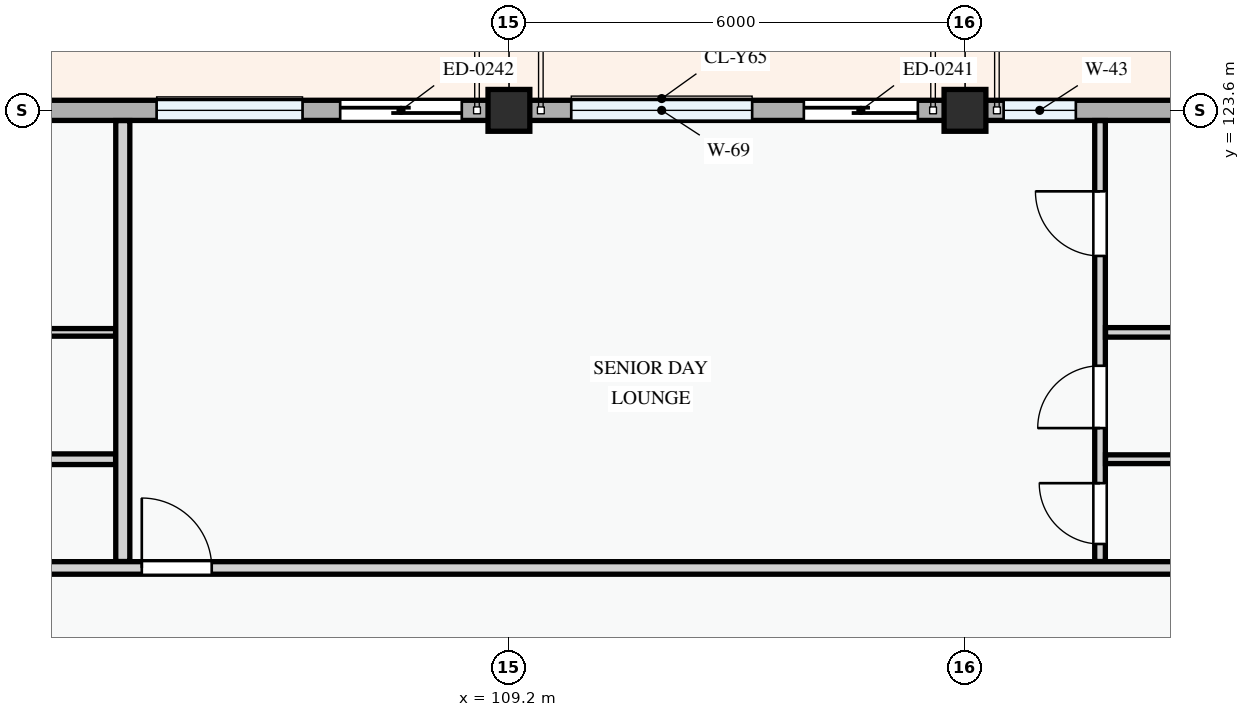
"""IFC4 building model, lengths in metres.
Left out: names, types, materials, properties, quantities, classifications, styles, units other than length and angle.
Written with IfcOpenShell. Run it as: python <this file> out.ifc"""

import sys

from ifc_helpers import new_model, si_unit, direction, frame, frame_2d, origin, origin_2d, place, context, subcontext, project, spatial, rectangle, extrude, element, fill, save


model = new_model("IFC4")
c1 = context("Model", 3, precision=1e-05, world=origin(), true_north=direction((0.0, 1.0)))
c2 = subcontext(c1, "Body", "Model", "MODEL_VIEW")
j1 = project(units=[si_unit("LENGTHUNIT", "METRE"), si_unit("PLANEANGLEUNIT", "RADIAN")], contexts=[c1])
p1 = place(None, origin())
s1 = spatial("IfcSite", under=j1, at=p1, CompositionType="ELEMENT")
p2 = place(p1, origin())
s2 = spatial("IfcBuilding", under=s1, at=p2, CompositionType="ELEMENT")
p3 = place(p2, frame((0.0, 0.0, 31.2)))
s3 = spatial("IfcBuildingStorey", under=s2, at=p3, CompositionType="ELEMENT", Elevation=31.2)
for number, where, z_axis, x_axis in (
    (1, (109.2, 123.6, 0.0), (0.0, 0.0, 1.0), (1.0, 0.0, 0.0)),
    (2, (115.2, 123.6, 0.0), (0.0, 0.0, 1.0), (1.0, 0.0, 0.0)),
):
    element("IfcColumn", number, at=place(p3, frame(where, z_axis=z_axis, x_axis=x_axis)), inside=s3, PredefinedType="COLUMN", context=c2, shape_type="SweptSolid", body=[
        extrude(rectangle(XDim=0.55, YDim=0.55, at=origin_2d()), origin(), (0.0, 0.0, 1.0), 3.3),
    ])
p4 = place(p3, frame((123.6, 123.6, 0.0), z_axis=(0.0, 0.0, 1.0), x_axis=(-1.0, 0.0, 0.0)))
e3 = element("IfcWall", 3, at=p4, inside=s3, PredefinedType="STANDARD", context=c2, shape_type="SweptSolid", body=[
    extrude(rectangle(XDim=8.4, YDim=0.265, at=frame_2d((4.2, 0.0))), origin(), (0.0, 0.0, 1.0), 2.375),
])
p5 = place(p4, frame((0.62, 0.0, 0.0)))
e4 = element("IfcOpeningElement", 4, at=p5, cuts=e3, PredefinedType="OPENING", context=c2, shape_type="SweptSolid", body=[
    extrude(rectangle(XDim=1.4, YDim=2.2, at=frame_2d((0.7, 1.1))), frame((0.0, 0.143, 0.0), z_axis=(0.0, -1.0, 0.0), x_axis=(1.0, 0.0, 0.0)), (0.0, 0.0, 1.0), 0.285),
])
p6 = place(p4, frame((3.797, 0.0, 0.78)))
e5 = element("IfcOpeningElement", 5, at=p6, cuts=e3, PredefinedType="OPENING", context=c2, shape_type="SweptSolid", body=[
    extrude(rectangle(XDim=1.1, YDim=1.3, at=frame_2d((0.55, 0.65))), frame((0.0, 0.143, 0.0), z_axis=(0.0, -1.0, 0.0), x_axis=(1.0, 0.0, 0.0)), (0.0, 0.0, 1.0), 0.285),
])
p7 = place(p4, frame((6.942, 0.0, 0.78)))
e6 = element("IfcOpeningElement", 6, at=p7, cuts=e3, PredefinedType="OPENING", context=c2, shape_type="SweptSolid", body=[
    extrude(rectangle(XDim=0.95, YDim=1.15, at=frame_2d((0.475, 0.575))), frame((0.0, 0.143, 0.0), z_axis=(0.0, -1.0, 0.0), x_axis=(1.0, 0.0, 0.0)), (0.0, 0.0, 1.0), 0.285),
])
p8 = place(p3, frame((115.2, 123.6, 0.0), z_axis=(0.0, 0.0, 1.0), x_axis=(-1.0, 0.0, 0.0)))
e7 = element("IfcWall", 7, at=p8, inside=s3, PredefinedType="STANDARD", context=c2, shape_type="SweptSolid", body=[
    extrude(rectangle(XDim=6.0, YDim=0.265, at=frame_2d((3.0, 0.0))), origin(), (0.0, 0.0, 1.0), 2.525),
])
p9 = place(p8, frame((0.62, 0.0, 0.0)))
e8 = element("IfcOpeningElement", 8, at=p9, cuts=e7, PredefinedType="OPENING", context=c2, shape_type="SweptSolid", body=[
    extrude(rectangle(XDim=1.5, YDim=2.2, at=frame_2d((0.75, 1.1))), frame((0.0, 0.143, 0.0), z_axis=(0.0, -1.0, 0.0), x_axis=(1.0, 0.0, 0.0)), (0.0, 0.0, 1.0), 0.285),
])
p10 = place(p8, frame((2.8, 0.0, 0.78)))
e9 = element("IfcOpeningElement", 9, at=p10, cuts=e7, PredefinedType="OPENING", context=c2, shape_type="SweptSolid", body=[
    extrude(rectangle(XDim=2.38, YDim=1.48, at=frame_2d((1.19, 0.74))), frame((0.0, 0.143, 0.0), z_axis=(0.0, -1.0, 0.0), x_axis=(1.0, 0.0, 0.0)), (0.0, 0.0, 1.0), 0.285),
])
p11 = place(p3, frame((109.2, 123.6, 0.0), z_axis=(0.0, 0.0, 1.0), x_axis=(-1.0, 0.0, 0.0)))
e10 = element("IfcWall", 10, at=p11, inside=s3, PredefinedType="STANDARD", context=c2, shape_type="SweptSolid", body=[
    extrude(rectangle(XDim=8.4, YDim=0.265, at=frame_2d((4.2, 0.0))), origin(), (0.0, 0.0, 1.0), 2.375),
])
p12 = place(p11, frame((0.62, 0.0, 0.0)))
e11 = element("IfcOpeningElement", 11, at=p12, cuts=e10, PredefinedType="OPENING", context=c2, shape_type="SweptSolid", body=[
    extrude(rectangle(XDim=1.6, YDim=2.2, at=frame_2d((0.8, 1.1))), frame((0.0, 0.143, 0.0), z_axis=(0.0, -1.0, 0.0), x_axis=(1.0, 0.0, 0.0)), (0.0, 0.0, 1.0), 0.285),
])
p13 = place(p11, frame((2.715, 0.0, 0.78)))
e12 = element("IfcOpeningElement", 12, at=p13, cuts=e10, PredefinedType="OPENING", context=c2, shape_type="SweptSolid", body=[
    extrude(rectangle(XDim=1.92, YDim=1.44, at=frame_2d((0.96, 0.72))), frame((0.0, 0.143, 0.0), z_axis=(0.0, -1.0, 0.0), x_axis=(1.0, 0.0, 0.0)), (0.0, 0.0, 1.0), 0.285),
])
p14 = place(p11, frame((6.17, 0.0, 0.78)))
e13 = element("IfcOpeningElement", 13, at=p14, cuts=e10, PredefinedType="OPENING", context=c2, shape_type="SweptSolid", body=[
    extrude(rectangle(XDim=0.95, YDim=1.15, at=frame_2d((0.475, 0.575))), frame((0.0, 0.143, 0.0), z_axis=(0.0, -1.0, 0.0), x_axis=(1.0, 0.0, 0.0)), (0.0, 0.0, 1.0), 0.285),
])
p15 = place(p3, frame((91.876, 120.679, 0.0), z_axis=(0.0, 0.0, 1.0), x_axis=(1.0, 0.0, 0.0)))
e14 = element("IfcWall", 14, at=p15, inside=s3, PredefinedType="PARTITIONING", context=c2, shape_type="SweptSolid", body=[
    extrude(rectangle(XDim=12.149, YDim=0.1, at=frame_2d((6.075, 0.0))), origin(), (0.0, 0.0, 1.0), 3.0),
])
p16 = place(p3, frame((91.876, 119.01, 0.0), z_axis=(0.0, 0.0, 1.0), x_axis=(1.0, 0.0, 0.0)))
e15 = element("IfcWall", 15, at=p16, inside=s3, PredefinedType="PARTITIONING", context=c2, shape_type="SweptSolid", body=[
    extrude(rectangle(XDim=12.149, YDim=0.14, at=frame_2d((6.075, 0.0))), origin(), (0.0, 0.0, 1.0), 3.0),
])
p17 = place(p3, frame((116.977, 117.665, 0.0), z_axis=(0.0, 0.0, 1.0), x_axis=(0.0, 1.0, 0.0)))
e16 = element("IfcWall", 16, at=p17, inside=s3, PredefinedType="PARTITIONING", context=c2, shape_type="SweptSolid", body=[
    extrude(rectangle(XDim=5.801, YDim=0.14, at=frame_2d((2.9, 0.0))), origin(), (0.0, 0.0, 1.0), 3.0),
])
p18 = place(p17, frame((0.231, 0.0, 0.0)))
e17 = element("IfcOpeningElement", 17, at=p18, cuts=e16, PredefinedType="OPENING", context=c2, shape_type="SweptSolid", body=[
    extrude(rectangle(XDim=0.8, YDim=2.1, at=frame_2d((0.4, 1.05))), frame((0.0, 0.08, 0.0), z_axis=(0.0, -1.0, 0.0), x_axis=(1.0, 0.0, 0.0)), (0.0, 0.0, 1.0), 0.16),
])
p19 = place(p17, frame((1.755, 0.0, 0.0)))
e18 = element("IfcOpeningElement", 18, at=p19, cuts=e16, PredefinedType="OPENING", context=c2, shape_type="SweptSolid", body=[
    extrude(rectangle(XDim=0.82, YDim=2.08, at=frame_2d((0.41, 1.04))), frame((0.0, 0.08, 0.0), z_axis=(0.0, -1.0, 0.0), x_axis=(1.0, 0.0, 0.0)), (0.0, 0.0, 1.0), 0.16),
])
p20 = place(p17, frame((4.02, 0.0, 0.0)))
e19 = element("IfcOpeningElement", 19, at=p20, cuts=e16, PredefinedType="OPENING", context=c2, shape_type="SweptSolid", body=[
    extrude(rectangle(XDim=0.85, YDim=2.1, at=frame_2d((0.425, 1.05))), frame((0.0, 0.08, 0.0), z_axis=(0.0, -1.0, 0.0), x_axis=(1.0, 0.0, 0.0)), (0.0, 0.0, 1.0), 0.16),
])
p21 = place(p3, frame((117.049, 120.679, 0.0), z_axis=(0.0, 0.0, 1.0), x_axis=(1.0, 0.0, 0.0)))
e20 = element("IfcWall", 20, at=p21, inside=s3, PredefinedType="PARTITIONING", context=c2, shape_type="SweptSolid", body=[
    extrude(rectangle(XDim=10.619, YDim=0.125, at=frame_2d((5.31, 0.0))), origin(), (0.0, 0.0, 1.0), 3.0),
])
p22 = place(p3, frame((117.049, 119.01, 0.0), z_axis=(0.0, 0.0, 1.0), x_axis=(1.0, 0.0, 0.0)))
e21 = element("IfcWall", 21, at=p22, inside=s3, PredefinedType="PARTITIONING", context=c2, shape_type="SweptSolid", body=[
    extrude(rectangle(XDim=10.619, YDim=0.115, at=frame_2d((5.31, 0.0))), origin(), (0.0, 0.0, 1.0), 3.0),
])
p23 = place(p3, frame((104.12, 117.665, 0.0), z_axis=(0.0, 0.0, 1.0), x_axis=(0.0, 1.0, 0.0)))
e22 = element("IfcWall", 22, at=p23, inside=s3, PredefinedType="PARTITIONING", context=c2, shape_type="SweptSolid", body=[
    extrude(rectangle(XDim=5.801, YDim=0.185, at=frame_2d((2.9, 0.0))), origin(), (0.0, 0.0, 1.0), 3.0),
])
p24 = place(p3, frame((80.534, 117.58, 0.0), z_axis=(0.0, 0.0, 1.0), x_axis=(1.0, 0.0, 0.0)))
e23 = element("IfcWall", 23, at=p24, inside=s3, PredefinedType="PARTITIONING", context=c2, shape_type="SweptSolid", body=[
    extrude(rectangle(XDim=72.006, YDim=0.165, at=frame_2d((36.003, 0.0))), origin(), (0.0, 0.0, 1.0), 3.0),
])
p25 = place(p24, frame((9.454, 0.0, 0.0)))
e24 = element("IfcOpeningElement", 24, at=p25, cuts=e23, PredefinedType="OPENING", context=c2, shape_type="SweptSolid", body=[
    extrude(rectangle(XDim=0.92, YDim=2.1, at=frame_2d((0.46, 1.05))), frame((0.0, 0.093, 0.0), z_axis=(0.0, -1.0, 0.0), x_axis=(1.0, 0.0, 0.0)), (0.0, 0.0, 1.0), 0.185),
])
p26 = place(p24, frame((23.835, 0.0, 0.0)))
e25 = element("IfcOpeningElement", 25, at=p26, cuts=e23, PredefinedType="OPENING", context=c2, shape_type="SweptSolid", body=[
    extrude(rectangle(XDim=0.92, YDim=2.1, at=frame_2d((0.46, 1.05))), frame((0.0, 0.093, 0.0), z_axis=(0.0, -1.0, 0.0), x_axis=(1.0, 0.0, 0.0)), (0.0, 0.0, 1.0), 0.185),
])
p27 = place(p24, frame((52.76, 0.0, 0.0)))
e26 = element("IfcOpeningElement", 26, at=p27, cuts=e23, PredefinedType="OPENING", context=c2, shape_type="SweptSolid", body=[
    extrude(rectangle(XDim=0.96, YDim=2.12, at=frame_2d((0.48, 1.06))), frame((0.0, 0.093, 0.0), z_axis=(0.0, -1.0, 0.0), x_axis=(1.0, 0.0, 0.0)), (0.0, 0.0, 1.0), 0.185),
])
p28 = place(p7, origin())
e27 = element("IfcWindow", 27, at=p28, inside=s3, PartitioningType="SINGLE_PANEL", PredefinedType="WINDOW", context=c2, shape_type="SweptSolid", body=[
    extrude(rectangle(XDim=0.95, YDim=1.15, at=frame_2d((0.475, 0.575))), frame((0.0, 0.03, 0.0), z_axis=(0.0, -1.0, 0.0), x_axis=(1.0, 0.0, 0.0)), (0.0, 0.0, 1.0), 0.06),
])
fill(e6, e27)
p29 = place(p9, frame((1.5, 0.0, 0.0), z_axis=(0.0, 0.0, 1.0), x_axis=(-1.0, 0.0, 0.0)))
e28 = element("IfcDoor", 28, at=p29, inside=s3, OperationType="SLIDING_TO_RIGHT", PredefinedType="DOOR", context=c2, shape_type="SweptSolid", body=[
    extrude(rectangle(XDim=1.5, YDim=2.2, at=frame_2d((0.75, 1.1))), frame((0.0, 0.025, 0.0), z_axis=(0.0, -1.0, 0.0), x_axis=(1.0, 0.0, 0.0)), (0.0, 0.0, 1.0), 0.05),
])
fill(e8, e28)
p30 = place(p10, origin())
e29 = element("IfcWindow", 29, at=p30, inside=s3, PartitioningType="DOUBLE_PANEL_VERTICAL", PredefinedType="WINDOW", context=c2, shape_type="SweptSolid", body=[
    extrude(rectangle(XDim=2.38, YDim=1.48, at=frame_2d((1.19, 0.74))), frame((0.0, 0.03, 0.0), z_axis=(0.0, -1.0, 0.0), x_axis=(1.0, 0.0, 0.0)), (0.0, 0.0, 1.0), 0.06),
])
fill(e9, e29)
p31 = place(p12, frame((1.6, 0.0, 0.0), z_axis=(0.0, 0.0, 1.0), x_axis=(-1.0, 0.0, 0.0)))
e30 = element("IfcDoor", 30, at=p31, inside=s3, OperationType="SLIDING_TO_LEFT", PredefinedType="DOOR", context=c2, shape_type="SweptSolid", body=[
    extrude(rectangle(XDim=1.6, YDim=2.2, at=frame_2d((0.8, 1.1))), frame((0.0, 0.025, 0.0), z_axis=(0.0, -1.0, 0.0), x_axis=(1.0, 0.0, 0.0)), (0.0, 0.0, 1.0), 0.05),
])
fill(e11, e30)
p32 = place(p13, origin())
e31 = element("IfcWindow", 31, at=p32, inside=s3, PartitioningType="DOUBLE_PANEL_VERTICAL", PredefinedType="WINDOW", context=c2, shape_type="SweptSolid", body=[
    extrude(rectangle(XDim=1.92, YDim=1.44, at=frame_2d((0.96, 0.72))), frame((0.0, 0.03, 0.0), z_axis=(0.0, -1.0, 0.0), x_axis=(1.0, 0.0, 0.0)), (0.0, 0.0, 1.0), 0.06),
])
fill(e12, e31)
p33 = place(p18, origin())
e32 = element("IfcDoor", 32, at=p33, inside=s3, OperationType="SINGLE_SWING_RIGHT", PredefinedType="DOOR", context=c2, shape_type="SweptSolid", body=[
    extrude(rectangle(XDim=0.8, YDim=2.1, at=frame_2d((0.4, 1.05))), frame((0.0, 0.025, 0.0), z_axis=(0.0, -1.0, 0.0), x_axis=(1.0, 0.0, 0.0)), (0.0, 0.0, 1.0), 0.05),
])
fill(e17, e32)
p34 = place(p19, origin())
e33 = element("IfcDoor", 33, at=p34, inside=s3, OperationType="SINGLE_SWING_LEFT", PredefinedType="DOOR", context=c2, shape_type="SweptSolid", body=[
    extrude(rectangle(XDim=0.82, YDim=2.08, at=frame_2d((0.41, 1.04))), frame((0.0, 0.025, 0.0), z_axis=(0.0, -1.0, 0.0), x_axis=(1.0, 0.0, 0.0)), (0.0, 0.0, 1.0), 0.05),
])
fill(e18, e33)
p35 = place(p20, origin())
e34 = element("IfcDoor", 34, at=p35, inside=s3, OperationType="SINGLE_SWING_RIGHT", PredefinedType="DOOR", context=c2, shape_type="SweptSolid", body=[
    extrude(rectangle(XDim=0.85, YDim=2.1, at=frame_2d((0.425, 1.05))), frame((0.0, 0.025, 0.0), z_axis=(0.0, -1.0, 0.0), x_axis=(1.0, 0.0, 0.0)), (0.0, 0.0, 1.0), 0.05),
])
fill(e19, e34)
p36 = place(p26, origin())
e35 = element("IfcDoor", 35, at=p36, inside=s3, OperationType="SINGLE_SWING_LEFT", PredefinedType="DOOR", context=c2, shape_type="SweptSolid", body=[
    extrude(rectangle(XDim=0.92, YDim=2.1, at=frame_2d((0.46, 1.05))), frame((0.0, 0.025, 0.0), z_axis=(0.0, -1.0, 0.0), x_axis=(1.0, 0.0, 0.0)), (0.0, 0.0, 1.0), 0.05),
])
fill(e25, e35)
save(model, sys.argv[1])
